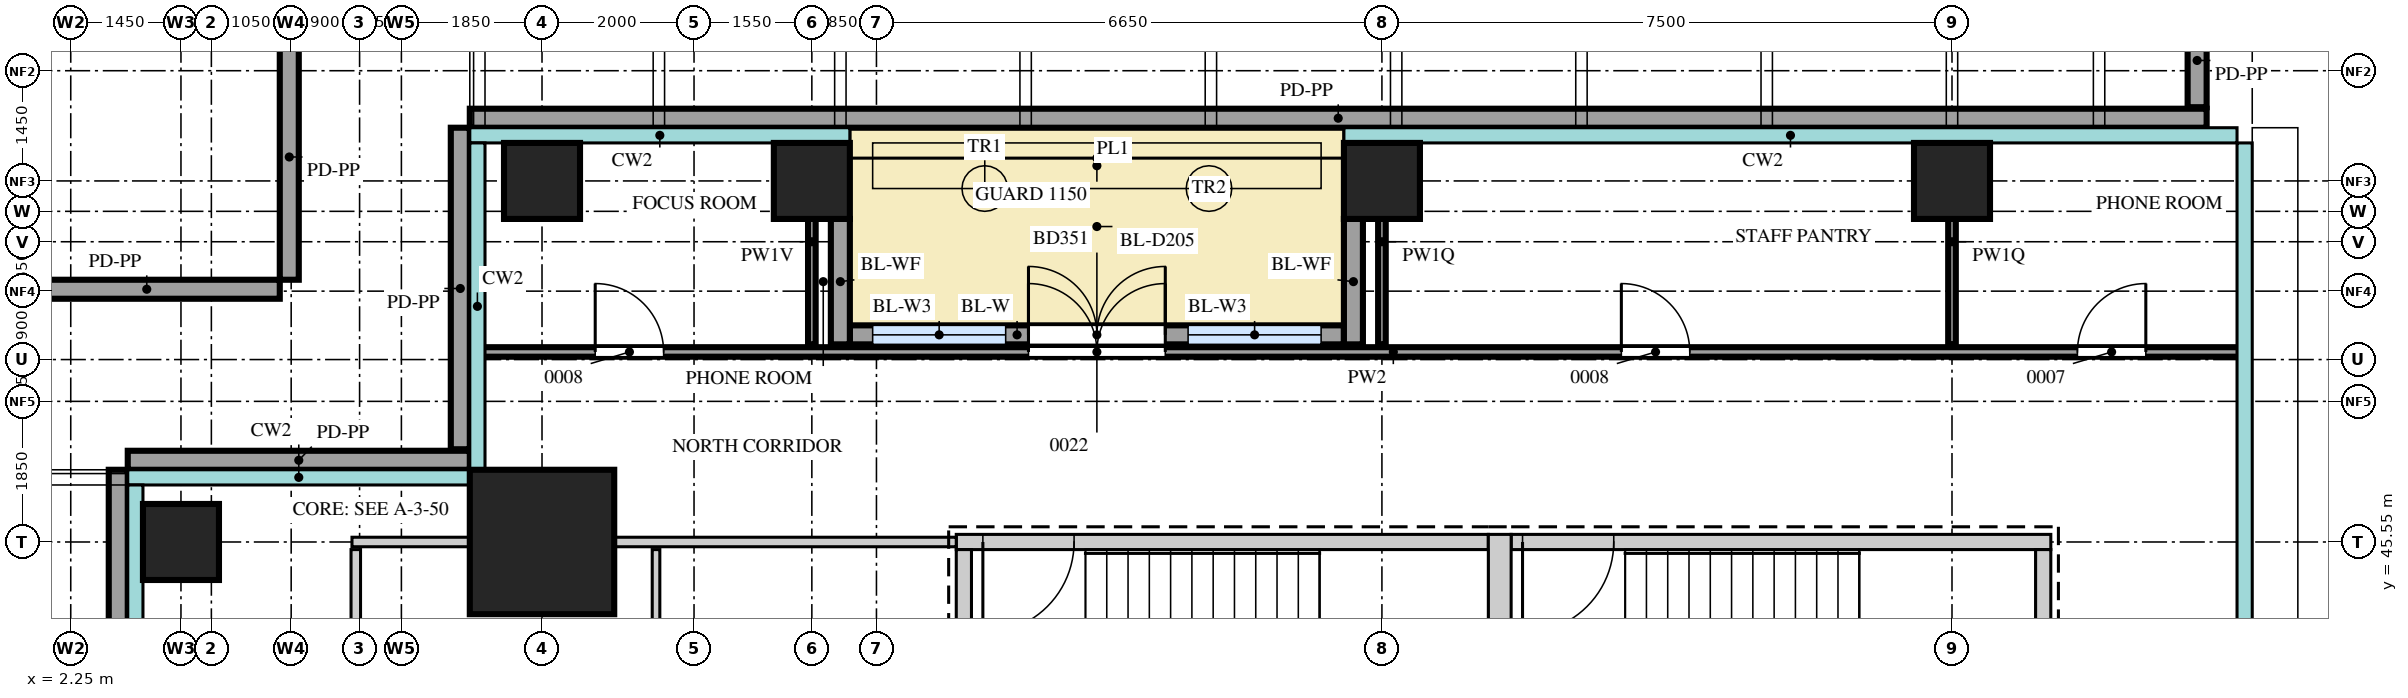
"""IFC4 building model, lengths in metres.
Left out: names, types, materials, properties, quantities, classifications, styles, units other than length and angle.
Written with IfcOpenShell. Run it as: python <this file> out.ifc"""

import sys

from ifc_helpers import new_model, si_unit, direction, frame, frame_2d, origin, origin_2d, place, context, subcontext, project, spatial, rectangle, extrude, source, transform, mapped, element, fill, save


model = new_model("IFC4")
c1 = context("Model", 3, precision=1e-05, world=origin(), true_north=direction((0.0, 1.0)))
c2 = subcontext(c1, "Body", "Model", "MODEL_VIEW")
j1 = project(units=[si_unit("LENGTHUNIT", "METRE"), si_unit("PLANEANGLEUNIT", "RADIAN")], contexts=[c1])
p1 = place(None, origin())
s1 = spatial("IfcSite", under=j1, at=p1, CompositionType="ELEMENT")
p2 = place(p1, origin())
s2 = spatial("IfcBuilding", under=s1, at=p2, CompositionType="ELEMENT")
p3 = place(p2, frame((0.0, 0.0, 164.7)))
s3 = spatial("IfcBuildingStorey", under=s2, at=p3, CompositionType="ELEMENT", Elevation=164.7)
m1 = source(origin(), c2, "Body", "SweptSolid", [
    extrude(rectangle(XDim=7.0, YDim=0.2, at=frame_2d((3.5, 0.0))), origin(), (0.0, 0.0, 1.0), 3.75),
])
p4 = place(p3, frame((13.9, 45.55, 0.0), z_axis=(0.0, 0.0, 1.0), x_axis=(1.0, 0.0, 0.0)))
e1 = element("IfcWall", 1, at=p4, inside=s3, PredefinedType="SHEAR", context=c2, shape_type="MappedRepresentation", body=[
    mapped(m1, transform((0.0, 0.0, 0.0))),
])
m2 = source(origin(), c2, "Body", "SweptSolid", [
    extrude(rectangle(XDim=1.2, YDim=2.1, at=frame_2d((0.6, 1.05))), frame((0.0, 0.11, 0.0), z_axis=(0.0, -1.0, 0.0), x_axis=(1.0, 0.0, 0.0)), (0.0, 0.0, 1.0), 0.22),
])
p5 = place(p4, frame((0.35, 0.0, 0.0)))
e2 = element("IfcOpeningElement", 2, at=p5, cuts=e1, PredefinedType="OPENING", context=c2, shape_type="MappedRepresentation", body=[
    mapped(m2, transform((0.0, 0.0, 0.0))),
])
m3 = source(origin(), c2, "Body", "SweptSolid", [
    extrude(rectangle(XDim=7.1, YDim=0.2, at=frame_2d((3.55, 0.0))), origin(), (0.0, 0.0, 1.0), 3.75),
])
p6 = place(p3, frame((21.2, 45.55, 0.0), z_axis=(0.0, 0.0, 1.0), x_axis=(1.0, 0.0, 0.0)))
e3 = element("IfcWall", 3, at=p6, inside=s3, PredefinedType="SHEAR", context=c2, shape_type="MappedRepresentation", body=[
    mapped(m3, transform((0.0, 0.0, 0.0))),
])
p7 = place(p6, frame((0.15, 0.0, 0.0)))
e4 = element("IfcOpeningElement", 4, at=p7, cuts=e3, PredefinedType="OPENING", context=c2, shape_type="MappedRepresentation", body=[
    mapped(m2, transform((0.0, 0.0, 0.0))),
])
m4 = source(origin(), c2, "Body", "SweptSolid", [
    extrude(rectangle(XDim=3.75, YDim=0.3, at=frame_2d((1.875, 0.0))), origin(), (0.0, 0.0, 1.0), 3.75),
])
p8 = place(p3, frame((21.05, 41.9, 0.0), z_axis=(0.0, 0.0, 1.0), x_axis=(0.0, 1.0, 0.0)))
e5 = element("IfcWall", 5, at=p8, inside=s3, PredefinedType="SHEAR", context=c2, shape_type="MappedRepresentation", body=[
    mapped(m4, transform((0.0, 0.0, 0.0))),
])
m5 = source(origin(), c2, "Body", "SweptSolid", [
    extrude(rectangle(XDim=3.35, YDim=0.2, at=frame_2d((1.675, 0.0))), origin(), (0.0, 0.0, 1.0), 3.75),
])
for number, where, z_axis, x_axis in (
    (6, (14.0, 42.1, 0.0), (0.0, 0.0, 1.0), (0.0, 1.0, 0.0)),
    (7, (28.2, 42.1, 0.0), (0.0, 0.0, 1.0), (0.0, 1.0, 0.0)),
):
    element("IfcWall", number, at=place(p3, frame(where, z_axis=z_axis, x_axis=x_axis)), inside=s3, PredefinedType="SHEAR", context=c2, shape_type="MappedRepresentation", body=[
        mapped(m5, transform((0.0, 0.0, 0.0))),
    ])
m6 = source(origin(), c2, "Body", "SweptSolid", [
    extrude(rectangle(XDim=1.9, YDim=1.9, at=origin_2d()), origin(), (0.0, 0.0, 1.0), 4.0),
])
p9 = place(p3, frame((8.45, 45.55, 0.0), z_axis=(0.0, 0.0, 1.0), x_axis=(1.0, 0.0, 0.0)))
e8 = element("IfcColumn", 8, at=p9, inside=s3, PredefinedType="COLUMN", context=c2, shape_type="MappedRepresentation", body=[
    mapped(m6, transform((0.0, 0.0, 0.0))),
])
m7 = source(origin(), c2, "Body", "SweptSolid", [
    extrude(rectangle(XDim=1.0, YDim=1.0, at=origin_2d()), origin(), (0.0, 0.0, 1.0), 3.75),
])
for number, where, z_axis, x_axis in (
    (9, (8.45, 50.3, 0.0), (0.0, 0.0, 1.0), (1.0, 0.0, 0.0)),
    (10, (12.0, 50.3, 0.0), (0.0, 0.0, 1.0), (1.0, 0.0, 0.0)),
    (11, (19.5, 50.3, 0.0), (0.0, 0.0, 1.0), (1.0, 0.0, 0.0)),
    (12, (27.0, 50.3, 0.0), (0.0, 0.0, 1.0), (1.0, 0.0, 0.0)),
    (13, (3.7, 45.55, 0.0), (0.0, 0.0, 1.0), (1.0, 0.0, 0.0)),
):
    element("IfcColumn", number, at=place(p3, frame(where, z_axis=z_axis, x_axis=x_axis)), inside=s3, PredefinedType="COLUMN", context=c2, shape_type="MappedRepresentation", body=[
        mapped(m7, transform((0.0, 0.0, 0.0))),
    ])
m8 = source(origin(), c2, "Body", "SweptSolid", [
    extrude(rectangle(XDim=6.5, YDim=0.25, at=frame_2d((3.25, 0.0))), origin(), (0.0, 0.0, 1.0), 3.75),
])
p10 = place(p3, frame((12.5, 48.275, 0.0), z_axis=(0.0, 0.0, 1.0), x_axis=(1.0, 0.0, 0.0)))
e14 = element("IfcWall", 14, at=p10, inside=s3, PredefinedType="SOLIDWALL", context=c2, shape_type="MappedRepresentation", body=[
    mapped(m8, transform((0.0, 0.0, 0.0))),
])
m9 = source(origin(), c2, "Body", "SweptSolid", [
    extrude(rectangle(XDim=1.75, YDim=2.4, at=frame_2d((0.875, 1.2))), frame((0.0, 0.135, 0.0), z_axis=(0.0, -1.0, 0.0), x_axis=(1.0, 0.0, 0.0)), (0.0, 0.0, 1.0), 0.27),
])
p11 = place(p10, frame((0.3, 0.0, 0.0)))
e15 = element("IfcOpeningElement", 15, at=p11, cuts=e14, PredefinedType="OPENING", context=c2, shape_type="MappedRepresentation", body=[
    mapped(m9, transform((0.0, 0.0, 0.0))),
])
p12 = place(p10, frame((4.45, 0.0, 0.0)))
e16 = element("IfcOpeningElement", 16, at=p12, cuts=e14, PredefinedType="OPENING", context=c2, shape_type="MappedRepresentation", body=[
    mapped(m9, transform((0.0, 0.0, 0.0))),
])
m10 = source(origin(), c2, "Body", "SweptSolid", [
    extrude(rectangle(XDim=1.8, YDim=2.4, at=frame_2d((0.9, 1.2))), frame((0.0, 0.135, 0.0), z_axis=(0.0, -1.0, 0.0), x_axis=(1.0, 0.0, 0.0)), (0.0, 0.0, 1.0), 0.27),
])
p13 = place(p10, frame((2.35, 0.0, 0.0)))
e17 = element("IfcOpeningElement", 17, at=p13, cuts=e14, PredefinedType="OPENING", context=c2, shape_type="MappedRepresentation", body=[
    mapped(m10, transform((0.0, 0.0, 0.0))),
])
m11 = source(origin(), c2, "Body", "SweptSolid", [
    extrude(rectangle(XDim=1.65, YDim=0.25, at=frame_2d((0.825, 0.0))), origin(), (0.0, 0.0, 1.0), 3.45),
])
for number, where, z_axis, x_axis in (
    (18, (12.375, 49.8, 0.0), (0.0, 0.0, 1.0), (0.0, -1.0, 0.0)),
    (19, (19.125, 49.8, 0.0), (0.0, 0.0, 1.0), (0.0, -1.0, 0.0)),
):
    element("IfcWall", number, at=place(p3, frame(where, z_axis=z_axis, x_axis=x_axis)), inside=s3, PredefinedType="SOLIDWALL", context=c2, shape_type="MappedRepresentation", body=[
        mapped(m11, transform((0.0, 0.0, 0.0))),
    ])
m12 = source(origin(), c2, "Body", "SweptSolid", [
    extrude(rectangle(XDim=39.0, YDim=0.25, at=frame_2d((19.5, 0.0))), origin(), (0.0, 0.0, 1.0), 1.1),
])
p14 = place(p3, frame((2.875, 7.5, 0.0), z_axis=(0.0, 0.0, 1.0), x_axis=(0.0, 1.0, 0.0)))
e20 = element("IfcWall", 20, at=p14, inside=s3, PredefinedType="SOLIDWALL", context=c2, shape_type="MappedRepresentation", body=[
    mapped(m12, transform((0.0, 0.0, 0.0))),
])
m13 = source(origin(), c2, "Body", "SweptSolid", [
    extrude(rectangle(XDim=4.5, YDim=0.25, at=frame_2d((2.25, 0.0))), origin(), (0.0, 0.0, 1.0), 1.1),
])
p15 = place(p3, frame((3.0, 46.625, 0.0), z_axis=(0.0, 0.0, 1.0), x_axis=(1.0, 0.0, 0.0)))
e21 = element("IfcWall", 21, at=p15, inside=s3, PredefinedType="SOLIDWALL", context=c2, shape_type="MappedRepresentation", body=[
    mapped(m13, transform((0.0, 0.0, 0.0))),
])
m14 = source(origin(), c2, "Body", "SweptSolid", [
    extrude(rectangle(XDim=4.23, YDim=0.25, at=frame_2d((2.115, 0.0))), origin(), (0.0, 0.0, 1.0), 1.1),
])
p16 = place(p3, frame((7.375, 46.77, 0.0), z_axis=(0.0, 0.0, 1.0), x_axis=(0.0, 1.0, 0.0)))
e22 = element("IfcWall", 22, at=p16, inside=s3, PredefinedType="SOLIDWALL", context=c2, shape_type="MappedRepresentation", body=[
    mapped(m14, transform((0.0, 0.0, 0.0))),
])
m15 = source(origin(), c2, "Body", "SweptSolid", [
    extrude(rectangle(XDim=22.85, YDim=0.25, at=frame_2d((11.425, 0.0))), origin(), (0.0, 0.0, 1.0), 1.1),
])
p17 = place(p3, frame((7.5, 51.125, 0.0), z_axis=(0.0, 0.0, 1.0), x_axis=(1.0, 0.0, 0.0)))
e23 = element("IfcWall", 23, at=p17, inside=s3, PredefinedType="SOLIDWALL", context=c2, shape_type="MappedRepresentation", body=[
    mapped(m15, transform((0.0, 0.0, 0.0))),
])
m16 = source(origin(), c2, "Body", "SweptSolid", [
    extrude(rectangle(XDim=1.23, YDim=0.25, at=frame_2d((0.615, 0.0))), origin(), (0.0, 0.0, 1.0), 1.1),
])
p18 = place(p3, frame((30.225, 51.27, 0.0), z_axis=(0.0, 0.0, 1.0), x_axis=(0.0, 1.0, 0.0)))
e24 = element("IfcWall", 24, at=p18, inside=s3, PredefinedType="SOLIDWALL", context=c2, shape_type="MappedRepresentation", body=[
    mapped(m16, transform((0.0, 0.0, 0.0))),
])
m17 = source(origin(), c2, "Body", "SweptSolid", [
    extrude(rectangle(XDim=3.23, YDim=0.25, at=frame_2d((1.615, 0.0))), origin(), (0.0, 0.0, 1.0), 1.1),
])
p19 = place(p3, frame((5.125, 52.23, 0.0), z_axis=(0.0, 0.0, 1.0), x_axis=(0.0, -1.0, 0.0)))
e25 = element("IfcWall", 25, at=p19, inside=s3, PredefinedType="SOLIDWALL", context=c2, shape_type="MappedRepresentation", body=[
    mapped(m17, transform((0.0, 0.0, 0.0))),
])
m18 = source(origin(), c2, "Body", "SweptSolid", [
    extrude(rectangle(XDim=3.5, YDim=0.25, at=frame_2d((1.75, 0.0))), origin(), (0.0, 0.0, 1.0), 1.1),
])
p20 = place(p3, frame((5.0, 48.875, 0.0), z_axis=(0.0, 0.0, 1.0), x_axis=(-1.0, 0.0, 0.0)))
e26 = element("IfcWall", 26, at=p20, inside=s3, PredefinedType="SOLIDWALL", context=c2, shape_type="MappedRepresentation", body=[
    mapped(m18, transform((0.0, 0.0, 0.0))),
])
m19 = source(origin(), c2, "Body", "SweptSolid", [
    extrude(rectangle(XDim=3.45, YDim=0.125, at=frame_2d((1.725, 0.0))), origin(), (0.0, 0.0, 1.0), 3.8),
])
p21 = place(p3, frame((6.0, 42.0, 0.0), z_axis=(0.0, 0.0, 1.0), x_axis=(0.0, 1.0, 0.0)))
e27 = element("IfcWall", 27, at=p21, inside=s3, PredefinedType="PARTITIONING", context=c2, shape_type="MappedRepresentation", body=[
    mapped(m19, transform((0.0, 0.0, 0.0))),
])
m20 = source(origin(), c2, "Body", "SweptSolid", [
    extrude(rectangle(XDim=3.45, YDim=0.1, at=frame_2d((1.725, 0.0))), origin(), (0.0, 0.0, 1.0), 3.8),
])
p22 = place(p3, frame((9.95, 42.0, 0.0), z_axis=(0.0, 0.0, 1.0), x_axis=(0.0, 1.0, 0.0)))
e28 = element("IfcWall", 28, at=p22, inside=s3, PredefinedType="PARTITIONING", context=c2, shape_type="MappedRepresentation", body=[
    mapped(m20, transform((0.0, 0.0, 0.0))),
])
m21 = source(origin(), c2, "Body", "SweptSolid", [
    extrude(rectangle(XDim=7.95, YDim=0.125, at=frame_2d((3.975, 0.0))), origin(), (0.0, 0.0, 1.0), 3.25),
])
p23 = place(p3, frame((5.95, 45.55, 0.0), z_axis=(0.0, 0.0, 1.0), x_axis=(1.0, 0.0, 0.0)))
e29 = element("IfcWall", 29, at=p23, inside=s3, PredefinedType="PARTITIONING", context=c2, shape_type="MappedRepresentation", body=[
    mapped(m21, transform((0.0, 0.0, 0.0))),
])
m22 = source(origin(), c2, "Body", "SweptSolid", [
    extrude(rectangle(XDim=23.15, YDim=0.125, at=frame_2d((11.575, 0.0))), origin(), (0.0, 0.0, 1.0), 3.8),
])
p24 = place(p3, frame((7.65, 48.05, 0.0), z_axis=(0.0, 0.0, 1.0), x_axis=(1.0, 0.0, 0.0)))
e30 = element("IfcWall", 30, at=p24, inside=s3, PredefinedType="PARTITIONING", context=c2, shape_type="MappedRepresentation", body=[
    mapped(m22, transform((0.0, 0.0, 0.0))),
])
m23 = source(origin(), c2, "Body", "SweptSolid", [
    extrude(rectangle(XDim=0.9, YDim=2.1, at=frame_2d((0.45, 1.05))), frame((0.0, 0.073, 0.0), z_axis=(0.0, -1.0, 0.0), x_axis=(1.0, 0.0, 0.0)), (0.0, 0.0, 1.0), 0.145),
])
p25 = place(p24, frame((1.5, 0.0, 0.0)))
e31 = element("IfcOpeningElement", 31, at=p25, cuts=e30, PredefinedType="OPENING", context=c2, shape_type="MappedRepresentation", body=[
    mapped(m23, transform((0.0, 0.0, 0.0))),
])
m24 = source(origin(), c2, "Body", "SweptSolid", [
    extrude(rectangle(XDim=1.8, YDim=2.1, at=frame_2d((0.9, 1.05))), frame((0.0, 0.073, 0.0), z_axis=(0.0, -1.0, 0.0), x_axis=(1.0, 0.0, 0.0)), (0.0, 0.0, 1.0), 0.145),
])
p26 = place(p24, frame((7.2, 0.0, 0.0)))
e32 = element("IfcOpeningElement", 32, at=p26, cuts=e30, PredefinedType="OPENING", context=c2, shape_type="MappedRepresentation", body=[
    mapped(m24, transform((0.0, 0.0, 0.0))),
])
p27 = place(p24, frame((15.0, 0.0, 0.0)))
e33 = element("IfcOpeningElement", 33, at=p27, cuts=e30, PredefinedType="OPENING", context=c2, shape_type="MappedRepresentation", body=[
    mapped(m23, transform((0.0, 0.0, 0.0))),
])
p28 = place(p24, frame((21.0, 0.0, 0.0)))
e34 = element("IfcOpeningElement", 34, at=p28, cuts=e30, PredefinedType="OPENING", context=c2, shape_type="MappedRepresentation", body=[
    mapped(m23, transform((0.0, 0.0, 0.0))),
])
m25 = source(origin(), c2, "Body", "SweptSolid", [
    extrude(rectangle(XDim=2.7, YDim=0.1, at=frame_2d((1.35, 0.0))), origin(), (0.0, 0.0, 1.0), 3.25),
])
p29 = place(p3, frame((12.0, 48.15, 0.0), z_axis=(0.0, 0.0, 1.0), x_axis=(0.0, 1.0, 0.0)))
e35 = element("IfcWall", 35, at=p29, inside=s3, PredefinedType="PARTITIONING", context=c2, shape_type="MappedRepresentation", body=[
    mapped(m25, transform((0.0, 0.0, 0.0))),
])
m26 = source(origin(), c2, "Body", "SweptSolid", [
    extrude(rectangle(XDim=2.7, YDim=0.1, at=frame_2d((1.35, 0.0))), origin(), (0.0, 0.0, 1.0), 3.42),
])
for number, where, z_axis, x_axis in (
    (36, (19.5, 48.15, 0.0), (0.0, 0.0, 1.0), (0.0, 1.0, 0.0)),
    (37, (27.0, 48.15, 0.0), (0.0, 0.0, 1.0), (0.0, 1.0, 0.0)),
):
    element("IfcWall", number, at=place(p3, frame(where, z_axis=z_axis, x_axis=x_axis)), inside=s3, PredefinedType="PARTITIONING", context=c2, shape_type="MappedRepresentation", body=[
        mapped(m26, transform((0.0, 0.0, 0.0))),
    ])
m27 = source(origin(), c2, "Body", "SweptSolid", [
    extrude(rectangle(XDim=1.75, YDim=2.4, at=frame_2d((0.875, 1.2))), frame((0.0, 0.03, 0.0), z_axis=(0.0, -1.0, 0.0), x_axis=(1.0, 0.0, 0.0)), (0.0, 0.0, 1.0), 0.06),
])
p30 = place(p11, origin())
e38 = element("IfcWindow", 38, at=p30, inside=s3, PartitioningType="SINGLE_PANEL", PredefinedType="WINDOW", context=c2, shape_type="MappedRepresentation", body=[
    mapped(m27, transform((0.0, 0.0, 0.0))),
])
fill(e15, e38)
p31 = place(p12, origin())
e39 = element("IfcWindow", 39, at=p31, inside=s3, PartitioningType="SINGLE_PANEL", PredefinedType="WINDOW", context=c2, shape_type="MappedRepresentation", body=[
    mapped(m27, transform((0.0, 0.0, 0.0))),
])
fill(e16, e39)
m28 = source(origin(), c2, "Body", "SweptSolid", [
    extrude(rectangle(XDim=1.8, YDim=2.4, at=frame_2d((0.9, 1.2))), frame((0.0, 0.025, 0.0), z_axis=(0.0, -1.0, 0.0), x_axis=(1.0, 0.0, 0.0)), (0.0, 0.0, 1.0), 0.05),
])
p32 = place(p13, origin())
e40 = element("IfcDoor", 40, at=p32, inside=s3, OperationType="DOUBLE_DOOR_DOUBLE_SWING", PredefinedType="DOOR", context=c2, shape_type="MappedRepresentation", body=[
    mapped(m28, transform((0.0, 0.0, 0.0))),
])
fill(e17, e40)
m29 = source(origin(), c2, "Body", "SweptSolid", [
    extrude(rectangle(XDim=0.9, YDim=2.1, at=frame_2d((0.45, 1.05))), frame((0.0, 0.025, 0.0), z_axis=(0.0, -1.0, 0.0), x_axis=(1.0, 0.0, 0.0)), (0.0, 0.0, 1.0), 0.05),
])
p33 = place(p25, origin())
e41 = element("IfcDoor", 41, at=p33, inside=s3, OperationType="SINGLE_SWING_RIGHT", PredefinedType="DOOR", context=c2, shape_type="MappedRepresentation", body=[
    mapped(m29, transform((0.0, 0.0, 0.0))),
])
fill(e31, e41)
m30 = source(origin(), c2, "Body", "SweptSolid", [
    extrude(rectangle(XDim=1.8, YDim=2.1, at=frame_2d((0.9, 1.05))), frame((0.0, 0.025, 0.0), z_axis=(0.0, -1.0, 0.0), x_axis=(1.0, 0.0, 0.0)), (0.0, 0.0, 1.0), 0.05),
])
p34 = place(p26, origin())
e42 = element("IfcDoor", 42, at=p34, inside=s3, OperationType="DOUBLE_DOOR_SINGLE_SWING", PredefinedType="DOOR", context=c2, shape_type="MappedRepresentation", body=[
    mapped(m30, transform((0.0, 0.0, 0.0))),
])
fill(e32, e42)
p35 = place(p27, origin())
e43 = element("IfcDoor", 43, at=p35, inside=s3, OperationType="SINGLE_SWING_RIGHT", PredefinedType="DOOR", context=c2, shape_type="MappedRepresentation", body=[
    mapped(m29, transform((0.0, 0.0, 0.0))),
])
fill(e33, e43)
p36 = place(p28, origin())
e44 = element("IfcDoor", 44, at=p36, inside=s3, OperationType="SINGLE_SWING_LEFT", PredefinedType="DOOR", context=c2, shape_type="MappedRepresentation", body=[
    mapped(m29, transform((0.0, 0.0, 0.0))),
])
fill(e34, e44)
m31 = source(origin(), c2, "Body", "SweptSolid", [
    extrude(rectangle(XDim=1.2, YDim=2.1, at=frame_2d((0.6, 1.05))), frame((0.0, 0.025, 0.0), z_axis=(0.0, -1.0, 0.0), x_axis=(1.0, 0.0, 0.0)), (0.0, 0.0, 1.0), 0.05),
])
p37 = place(p5, origin())
e45 = element("IfcDoor", 45, at=p37, inside=s3, OperationType="SINGLE_SWING_LEFT", PredefinedType="DOOR", context=c2, shape_type="MappedRepresentation", body=[
    mapped(m31, transform((0.0, 0.0, 0.0))),
])
fill(e2, e45)
p38 = place(p7, origin())
e46 = element("IfcDoor", 46, at=p38, inside=s3, OperationType="SINGLE_SWING_LEFT", PredefinedType="DOOR", context=c2, shape_type="MappedRepresentation", body=[
    mapped(m31, transform((0.0, 0.0, 0.0))),
])
fill(e4, e46)
save(model, sys.argv[1])
